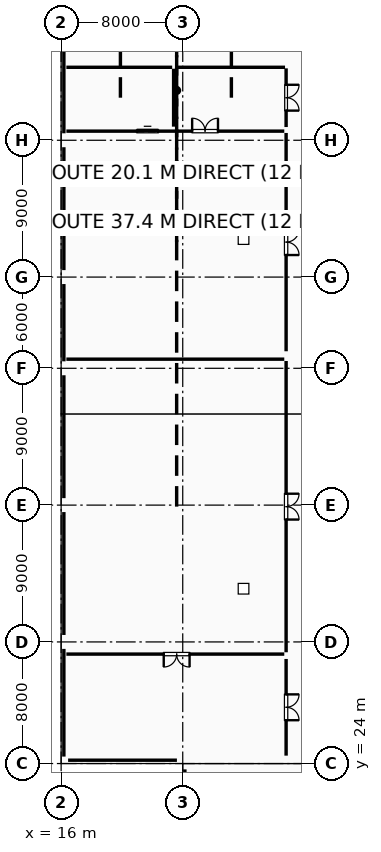
"""IFC4 building model, lengths in metres.
Left out: names, types, materials, properties, quantities, classifications, styles, units other than length and angle.
Written with IfcOpenShell. Run it as: python <this file> out.ifc"""

import sys

from ifc_helpers import new_model, si_unit, direction, frame, frame_2d, origin, origin_2d, place, context, subcontext, project, spatial, rectangle, extrude, element, fill, save


model = new_model("IFC4")
c1 = context("Model", 3, precision=1e-05, world=origin(), true_north=direction((0.0, 1.0)))
c2 = subcontext(c1, "Body", "Model", "MODEL_VIEW")
j1 = project(units=[si_unit("LENGTHUNIT", "METRE"), si_unit("PLANEANGLEUNIT", "RADIAN")], contexts=[c1])
p1 = place(None, origin())
s1 = spatial("IfcSite", under=j1, at=p1, CompositionType="ELEMENT")
p2 = place(p1, origin())
s2 = spatial("IfcBuilding", under=s1, at=p2, CompositionType="ELEMENT")
p3 = place(p2, frame((0.0, 0.0, 19.8)))
s3 = spatial("IfcBuildingStorey", under=s2, at=p3, CompositionType="ELEMENT", Elevation=19.8)
for number, where, z_axis, x_axis in (
    (1, (16.0, 24.0, 0.0), (0.0, 0.0, 1.0), (1.0, 0.0, 0.0)),
    (2, (16.0, 32.0, 0.0), (0.0, 0.0, 1.0), (1.0, 0.0, 0.0)),
    (3, (16.0, 41.0, 0.0), (0.0, 0.0, 1.0), (1.0, 0.0, 0.0)),
    (4, (16.0, 50.0, 0.0), (0.0, 0.0, 1.0), (1.0, 0.0, 0.0)),
    (5, (16.0, 56.0, 0.0), (0.0, 0.0, 1.0), (1.0, 0.0, 0.0)),
    (6, (16.0, 65.0, 0.0), (0.0, 0.0, 1.0), (1.0, 0.0, 0.0)),
):
    element("IfcColumn", number, at=place(p3, frame(where, z_axis=z_axis, x_axis=x_axis)), inside=s3, PredefinedType="COLUMN", context=c2, shape_type="SweptSolid", body=[
        extrude(rectangle(XDim=0.9, YDim=0.9, at=origin_2d()), origin(), (0.0, 0.0, 1.0), 4.5),
    ])
for number, where, z_axis, x_axis in (
    (7, (24.0, 24.0, 0.0), (0.0, 0.0, 1.0), (1.0, 0.0, 0.0)),
    (8, (24.0, 50.0, 0.0), (0.0, 0.0, 1.0), (1.0, 0.0, 0.0)),
    (9, (24.0, 56.0, 0.0), (0.0, 0.0, 1.0), (1.0, 0.0, 0.0)),
    (10, (24.0, 65.0, 0.0), (0.0, 0.0, 1.0), (1.0, 0.0, 0.0)),
    (11, (32.0, 24.0, 0.0), (0.0, 0.0, 1.0), (1.0, 0.0, 0.0)),
    (12, (32.0, 50.0, 0.0), (0.0, 0.0, 1.0), (1.0, 0.0, 0.0)),
    (13, (32.0, 56.0, 0.0), (0.0, 0.0, 1.0), (1.0, 0.0, 0.0)),
    (14, (32.0, 65.0, 0.0), (0.0, 0.0, 1.0), (1.0, 0.0, 0.0)),
):
    element("IfcColumn", number, at=place(p3, frame(where, z_axis=z_axis, x_axis=x_axis)), inside=s3, PredefinedType="COLUMN", context=c2, shape_type="SweptSolid", body=[
        extrude(rectangle(XDim=0.75, YDim=0.75, at=origin_2d()), origin(), (0.0, 0.0, 1.0), 4.5),
    ])
p4 = place(p3, frame((24.14, 8.13, 0.0), z_axis=(0.0, 0.0, 1.0), x_axis=(0.0, 1.0, 0.0)))
e15 = element("IfcWall", 15, at=p4, inside=s3, PredefinedType="ELEMENTEDWALL", context=c2, shape_type="SweptSolid", body=[
    extrude(rectangle(XDim=15.487, YDim=0.24, at=frame_2d((7.744, 0.0))), origin(), (0.0, 0.0, 1.0), 4.28),
])
p5 = place(p3, frame((23.617, 24.22, 0.0), z_axis=(0.0, 0.0, 1.0), x_axis=(-1.0, 0.0, 0.0)))
e16 = element("IfcWall", 16, at=p5, inside=s3, PredefinedType="STANDARD", context=c2, shape_type="SweptSolid", body=[
    extrude(rectangle(XDim=7.159, YDim=0.4, at=frame_2d((3.58, 0.0))), origin(), (0.0, 0.0, 1.0), 3.735),
])
p6 = place(p5, frame((2.38, 0.0, 0.95)))
e17 = element("IfcOpeningElement", 17, at=p6, cuts=e16, PredefinedType="OPENING", context=c2, shape_type="SweptSolid", body=[
    extrude(rectangle(XDim=2.4, YDim=1.8, at=frame_2d((1.2, 0.9))), frame((0.0, 0.21, 0.0), z_axis=(0.0, -1.0, 0.0), x_axis=(1.0, 0.0, 0.0)), (0.0, 0.0, 1.0), 0.42),
])
p7 = place(p3, frame((16.18, 24.458, 0.0), z_axis=(0.0, 0.0, 1.0), x_axis=(0.0, 1.0, 0.0)))
e18 = element("IfcWall", 18, at=p7, inside=s3, PredefinedType="STANDARD", context=c2, shape_type="SweptSolid", body=[
    extrude(rectangle(XDim=7.084, YDim=0.32, at=frame_2d((3.542, 0.0))), origin(), (0.0, 0.0, 1.0), 3.635),
])
p8 = place(p7, frame((2.342, 0.0, 0.95)))
e19 = element("IfcOpeningElement", 19, at=p8, cuts=e18, PredefinedType="OPENING", context=c2, shape_type="SweptSolid", body=[
    extrude(rectangle(XDim=2.4, YDim=2.1, at=frame_2d((1.2, 1.05))), frame((0.0, 0.17, 0.0), z_axis=(0.0, -1.0, 0.0), x_axis=(1.0, 0.0, 0.0)), (0.0, 0.0, 1.0), 0.34),
])
p9 = place(p3, frame((16.18, 32.458, 0.0), z_axis=(0.0, 0.0, 1.0), x_axis=(0.0, 1.0, 0.0)))
e20 = element("IfcWall", 20, at=p9, inside=s3, PredefinedType="STANDARD", context=c2, shape_type="SweptSolid", body=[
    extrude(rectangle(XDim=8.084, YDim=0.32, at=frame_2d((4.042, 0.0))), origin(), (0.0, 0.0, 1.0), 3.685),
])
p10 = place(p9, frame((3.592, 0.0, 0.95)))
e21 = element("IfcOpeningElement", 21, at=p10, cuts=e20, PredefinedType="OPENING", context=c2, shape_type="SweptSolid", body=[
    extrude(rectangle(XDim=0.9, YDim=1.2, at=frame_2d((0.45, 0.6))), frame((0.0, 0.17, 0.0), z_axis=(0.0, -1.0, 0.0), x_axis=(1.0, 0.0, 0.0)), (0.0, 0.0, 1.0), 0.34),
])
p11 = place(p3, frame((16.18, 41.458, 0.0), z_axis=(0.0, 0.0, 1.0), x_axis=(0.0, 1.0, 0.0)))
e22 = element("IfcWall", 22, at=p11, inside=s3, PredefinedType="STANDARD", context=c2, shape_type="SweptSolid", body=[
    extrude(rectangle(XDim=8.084, YDim=0.32, at=frame_2d((4.042, 0.0))), origin(), (0.0, 0.0, 1.0), 3.735),
])
p12 = place(p11, frame((3.592, 0.0, 0.95)))
e23 = element("IfcOpeningElement", 23, at=p12, cuts=e22, PredefinedType="OPENING", context=c2, shape_type="SweptSolid", body=[
    extrude(rectangle(XDim=0.9, YDim=1.5, at=frame_2d((0.45, 0.75))), frame((0.0, 0.17, 0.0), z_axis=(0.0, -1.0, 0.0), x_axis=(1.0, 0.0, 0.0)), (0.0, 0.0, 1.0), 0.34),
])
p13 = place(p3, frame((16.18, 50.458, 0.0), z_axis=(0.0, 0.0, 1.0), x_axis=(0.0, 1.0, 0.0)))
e24 = element("IfcWall", 24, at=p13, inside=s3, PredefinedType="STANDARD", context=c2, shape_type="SweptSolid", body=[
    extrude(rectangle(XDim=5.084, YDim=0.32, at=frame_2d((2.542, 0.0))), origin(), (0.0, 0.0, 1.0), 3.785),
])
p14 = place(p13, frame((2.092, 0.0, 0.95)))
e25 = element("IfcOpeningElement", 25, at=p14, cuts=e24, PredefinedType="OPENING", context=c2, shape_type="SweptSolid", body=[
    extrude(rectangle(XDim=0.9, YDim=1.8, at=frame_2d((0.45, 0.9))), frame((0.0, 0.17, 0.0), z_axis=(0.0, -1.0, 0.0), x_axis=(1.0, 0.0, 0.0)), (0.0, 0.0, 1.0), 0.34),
])
p15 = place(p3, frame((16.18, 56.458, 0.0), z_axis=(0.0, 0.0, 1.0), x_axis=(0.0, 1.0, 0.0)))
e26 = element("IfcWall", 26, at=p15, inside=s3, PredefinedType="STANDARD", context=c2, shape_type="SweptSolid", body=[
    extrude(rectangle(XDim=8.084, YDim=0.32, at=frame_2d((4.042, 0.0))), origin(), (0.0, 0.0, 1.0), 3.835),
])
p16 = place(p15, frame((3.592, 0.0, 0.95)))
e27 = element("IfcOpeningElement", 27, at=p16, cuts=e26, PredefinedType="OPENING", context=c2, shape_type="SweptSolid", body=[
    extrude(rectangle(XDim=0.9, YDim=2.1, at=frame_2d((0.45, 1.05))), frame((0.0, 0.17, 0.0), z_axis=(0.0, -1.0, 0.0), x_axis=(1.0, 0.0, 0.0)), (0.0, 0.0, 1.0), 0.34),
])
p17 = place(p3, frame((16.18, 65.458, 0.0), z_axis=(0.0, 0.0, 1.0), x_axis=(0.0, 1.0, 0.0)))
e28 = element("IfcWall", 28, at=p17, inside=s3, PredefinedType="STANDARD", context=c2, shape_type="SweptSolid", body=[
    extrude(rectangle(XDim=8.084, YDim=0.32, at=frame_2d((4.042, 0.0))), origin(), (0.0, 0.0, 1.0), 3.885),
])
p18 = place(p3, frame((16.344, 50.6, 0.0), z_axis=(0.0, 0.0, 1.0), x_axis=(1.0, 0.0, 0.0)))
e29 = element("IfcWall", 29, at=p18, inside=s3, PredefinedType="PARTITIONING", context=c2, shape_type="SweptSolid", body=[
    extrude(rectangle(XDim=14.336, YDim=0.2, at=frame_2d((7.168, 0.0))), origin(), (0.0, 0.0, 1.0), 4.5),
])
p19 = place(p3, frame((30.8, 50.48, 0.0), z_axis=(0.0, 0.0, 1.0), x_axis=(0.0, -1.0, 0.0)))
e30 = element("IfcWall", 30, at=p19, inside=s3, PredefinedType="PARTITIONING", context=c2, shape_type="SweptSolid", body=[
    extrude(rectangle(XDim=19.16, YDim=0.2, at=frame_2d((9.58, 0.0))), origin(), (0.0, 0.0, 1.0), 4.5),
])
p20 = place(p19, frame((8.73, 0.0, 0.0)))
e31 = element("IfcOpeningElement", 31, at=p20, cuts=e30, PredefinedType="OPENING", context=c2, shape_type="SweptSolid", body=[
    extrude(rectangle(XDim=1.7, YDim=2.25, at=frame_2d((0.85, 1.125))), frame((0.0, 0.11, 0.0), z_axis=(0.0, -1.0, 0.0), x_axis=(1.0, 0.0, 0.0)), (0.0, 0.0, 1.0), 0.22),
])
p21 = place(p3, frame((30.68, 31.2, 0.0), z_axis=(0.0, 0.0, 1.0), x_axis=(-1.0, 0.0, 0.0)))
e32 = element("IfcWall", 32, at=p21, inside=s3, PredefinedType="PARTITIONING", context=c2, shape_type="SweptSolid", body=[
    extrude(rectangle(XDim=14.336, YDim=0.2, at=frame_2d((7.168, 0.0))), origin(), (0.0, 0.0, 1.0), 4.5),
])
p22 = place(p21, frame((6.23, 0.0, 0.0)))
e33 = element("IfcOpeningElement", 33, at=p22, cuts=e32, PredefinedType="OPENING", context=c2, shape_type="SweptSolid", body=[
    extrude(rectangle(XDim=1.7, YDim=2.25, at=frame_2d((0.85, 1.125))), frame((0.0, 0.11, 0.0), z_axis=(0.0, -1.0, 0.0), x_axis=(1.0, 0.0, 0.0)), (0.0, 0.0, 1.0), 0.22),
])
p23 = place(p3, frame((16.344, 65.6, 0.0), z_axis=(0.0, 0.0, 1.0), x_axis=(1.0, 0.0, 0.0)))
e34 = element("IfcWall", 34, at=p23, inside=s3, PredefinedType="PARTITIONING", context=c2, shape_type="SweptSolid", body=[
    extrude(rectangle(XDim=14.336, YDim=0.2, at=frame_2d((7.168, 0.0))), origin(), (0.0, 0.0, 1.0), 4.24),
])
p24 = place(p23, frame((4.642, 0.0, 0.0)))
e35 = element("IfcOpeningElement", 35, at=p24, cuts=e34, PredefinedType="OPENING", context=c2, shape_type="SweptSolid", body=[
    extrude(rectangle(XDim=1.4, YDim=2.15, at=frame_2d((0.7, 1.075))), frame((0.0, 0.11, 0.0), z_axis=(0.0, -1.0, 0.0), x_axis=(1.0, 0.0, 0.0)), (0.0, 0.0, 1.0), 0.22),
])
p25 = place(p23, frame((8.275, 0.0, 0.0)))
e36 = element("IfcOpeningElement", 36, at=p25, cuts=e34, PredefinedType="OPENING", context=c2, shape_type="SweptSolid", body=[
    extrude(rectangle(XDim=1.7, YDim=2.25, at=frame_2d((0.85, 1.125))), frame((0.0, 0.11, 0.0), z_axis=(0.0, -1.0, 0.0), x_axis=(1.0, 0.0, 0.0)), (0.0, 0.0, 1.0), 0.22),
])
p26 = place(p3, frame((30.8, 65.48, 0.0), z_axis=(0.0, 0.0, 1.0), x_axis=(0.0, -1.0, 0.0)))
e37 = element("IfcWall", 37, at=p26, inside=s3, PredefinedType="PARTITIONING", context=c2, shape_type="SweptSolid", body=[
    extrude(rectangle(XDim=14.36, YDim=0.2, at=frame_2d((7.18, 0.0))), origin(), (0.0, 0.0, 1.0), 4.24),
])
p27 = place(p26, frame((6.33, 0.0, 0.0)))
e38 = element("IfcOpeningElement", 38, at=p27, cuts=e37, PredefinedType="OPENING", context=c2, shape_type="SweptSolid", body=[
    extrude(rectangle(XDim=1.7, YDim=2.25, at=frame_2d((0.85, 1.125))), frame((0.0, 0.11, 0.0), z_axis=(0.0, -1.0, 0.0), x_axis=(1.0, 0.0, 0.0)), (0.0, 0.0, 1.0), 0.22),
])
p28 = place(p3, frame((16.344, 69.8, 0.0), z_axis=(0.0, 0.0, 1.0), x_axis=(1.0, 0.0, 0.0)))
e39 = element("IfcWall", 39, at=p28, inside=s3, PredefinedType="PARTITIONING", context=c2, shape_type="SweptSolid", body=[
    extrude(rectangle(XDim=6.961, YDim=0.15, at=frame_2d((3.48, 0.0))), origin(), (0.0, 0.0, 1.0), 4.5),
])
p29 = place(p3, frame((23.4, 69.705, 0.0), z_axis=(0.0, 0.0, 1.0), x_axis=(0.0, -1.0, 0.0)))
e40 = element("IfcWall", 40, at=p29, inside=s3, PredefinedType="PARTITIONING", context=c2, shape_type="SweptSolid", body=[
    extrude(rectangle(XDim=3.81, YDim=0.15, at=frame_2d((1.905, 0.0))), origin(), (0.0, 0.0, 1.0), 4.5),
])
p30 = place(p3, frame((23.67, 69.8, 0.0), z_axis=(0.0, 0.0, 1.0), x_axis=(1.0, 0.0, 0.0)))
e41 = element("IfcWall", 41, at=p30, inside=s3, PredefinedType="PARTITIONING", context=c2, shape_type="SweptSolid", body=[
    extrude(rectangle(XDim=7.06, YDim=0.1, at=frame_2d((3.53, 0.0))), origin(), (0.0, 0.0, 1.0), 4.24),
])
p31 = place(p3, frame((30.8, 69.73, 0.0), z_axis=(0.0, 0.0, 1.0), x_axis=(0.0, -1.0, 0.0)))
e42 = element("IfcWall", 42, at=p31, inside=s3, PredefinedType="PARTITIONING", context=c2, shape_type="SweptSolid", body=[
    extrude(rectangle(XDim=3.86, YDim=0.1, at=frame_2d((1.93, 0.0))), origin(), (0.0, 0.0, 1.0), 4.24),
])
p32 = place(p31, frame((1.08, 0.0, 0.0)))
e43 = element("IfcOpeningElement", 43, at=p32, cuts=e42, PredefinedType="OPENING", context=c2, shape_type="SweptSolid", body=[
    extrude(rectangle(XDim=1.7, YDim=2.25, at=frame_2d((0.85, 1.125))), frame((0.0, 0.06, 0.0), z_axis=(0.0, -1.0, 0.0), x_axis=(1.0, 0.0, 0.0)), (0.0, 0.0, 1.0), 0.12),
])
p33 = place(p3, frame((30.8, 30.88, 0.0), z_axis=(0.0, 0.0, 1.0), x_axis=(0.0, -1.0, 0.0)))
e44 = element("IfcWall", 44, at=p33, inside=s3, PredefinedType="PARTITIONING", context=c2, shape_type="SweptSolid", body=[
    extrude(rectangle(XDim=6.36, YDim=0.2, at=frame_2d((3.18, 0.0))), origin(), (0.0, 0.0, 1.0), 4.5),
])
p34 = place(p33, frame((2.33, 0.0, 0.0)))
e45 = element("IfcOpeningElement", 45, at=p34, cuts=e44, PredefinedType="OPENING", context=c2, shape_type="SweptSolid", body=[
    extrude(rectangle(XDim=1.7, YDim=2.25, at=frame_2d((0.85, 1.125))), frame((0.0, 0.11, 0.0), z_axis=(0.0, -1.0, 0.0), x_axis=(1.0, 0.0, 0.0)), (0.0, 0.0, 1.0), 0.22),
])
p35 = place(p6, origin())
e46 = element("IfcWindow", 46, at=p35, inside=s3, PartitioningType="SINGLE_PANEL", PredefinedType="SKYLIGHT", context=c2, shape_type="SweptSolid", body=[
    extrude(rectangle(XDim=2.4, YDim=1.8, at=frame_2d((1.2, 0.9))), frame((0.0, 0.03, 0.0), z_axis=(0.0, -1.0, 0.0), x_axis=(1.0, 0.0, 0.0)), (0.0, 0.0, 1.0), 0.06),
])
fill(e17, e46)
p36 = place(p8, origin())
e47 = element("IfcWindow", 47, at=p36, inside=s3, PartitioningType="SINGLE_PANEL", PredefinedType="SKYLIGHT", context=c2, shape_type="SweptSolid", body=[
    extrude(rectangle(XDim=2.4, YDim=2.1, at=frame_2d((1.2, 1.05))), frame((0.0, 0.03, 0.0), z_axis=(0.0, -1.0, 0.0), x_axis=(1.0, 0.0, 0.0)), (0.0, 0.0, 1.0), 0.06),
])
fill(e19, e47)
p37 = place(p10, origin())
e48 = element("IfcWindow", 48, at=p37, inside=s3, PartitioningType="SINGLE_PANEL", PredefinedType="WINDOW", context=c2, shape_type="SweptSolid", body=[
    extrude(rectangle(XDim=0.9, YDim=1.2, at=frame_2d((0.45, 0.6))), frame((0.0, 0.03, 0.0), z_axis=(0.0, -1.0, 0.0), x_axis=(1.0, 0.0, 0.0)), (0.0, 0.0, 1.0), 0.06),
])
fill(e21, e48)
p38 = place(p12, origin())
e49 = element("IfcWindow", 49, at=p38, inside=s3, PartitioningType="SINGLE_PANEL", PredefinedType="WINDOW", context=c2, shape_type="SweptSolid", body=[
    extrude(rectangle(XDim=0.9, YDim=1.5, at=frame_2d((0.45, 0.75))), frame((0.0, 0.03, 0.0), z_axis=(0.0, -1.0, 0.0), x_axis=(1.0, 0.0, 0.0)), (0.0, 0.0, 1.0), 0.06),
])
fill(e23, e49)
p39 = place(p14, origin())
e50 = element("IfcWindow", 50, at=p39, inside=s3, PartitioningType="SINGLE_PANEL", PredefinedType="WINDOW", context=c2, shape_type="SweptSolid", body=[
    extrude(rectangle(XDim=0.9, YDim=1.8, at=frame_2d((0.45, 0.9))), frame((0.0, 0.03, 0.0), z_axis=(0.0, -1.0, 0.0), x_axis=(1.0, 0.0, 0.0)), (0.0, 0.0, 1.0), 0.06),
])
fill(e25, e50)
p40 = place(p16, origin())
e51 = element("IfcWindow", 51, at=p40, inside=s3, PartitioningType="SINGLE_PANEL", PredefinedType="WINDOW", context=c2, shape_type="SweptSolid", body=[
    extrude(rectangle(XDim=0.9, YDim=2.1, at=frame_2d((0.45, 1.05))), frame((0.0, 0.03, 0.0), z_axis=(0.0, -1.0, 0.0), x_axis=(1.0, 0.0, 0.0)), (0.0, 0.0, 1.0), 0.06),
])
fill(e27, e51)
p41 = place(p20, origin())
e52 = element("IfcDoor", 52, at=p41, inside=s3, OperationType="DOUBLE_DOOR_SINGLE_SWING", PredefinedType="DOOR", context=c2, shape_type="SweptSolid", body=[
    extrude(rectangle(XDim=1.7, YDim=2.25, at=frame_2d((0.85, 1.125))), frame((0.0, 0.025, 0.0), z_axis=(0.0, -1.0, 0.0), x_axis=(1.0, 0.0, 0.0)), (0.0, 0.0, 1.0), 0.05),
])
fill(e31, e52)
p42 = place(p22, origin())
e53 = element("IfcDoor", 53, at=p42, inside=s3, OperationType="DOUBLE_DOOR_SINGLE_SWING", PredefinedType="DOOR", context=c2, shape_type="SweptSolid", body=[
    extrude(rectangle(XDim=1.7, YDim=2.25, at=frame_2d((0.85, 1.125))), frame((0.0, 0.025, 0.0), z_axis=(0.0, -1.0, 0.0), x_axis=(1.0, 0.0, 0.0)), (0.0, 0.0, 1.0), 0.05),
])
fill(e33, e53)
p43 = place(p27, origin())
e54 = element("IfcDoor", 54, at=p43, inside=s3, OperationType="DOUBLE_DOOR_SINGLE_SWING", PredefinedType="DOOR", context=c2, shape_type="SweptSolid", body=[
    extrude(rectangle(XDim=1.7, YDim=2.25, at=frame_2d((0.85, 1.125))), frame((0.0, 0.025, 0.0), z_axis=(0.0, -1.0, 0.0), x_axis=(1.0, 0.0, 0.0)), (0.0, 0.0, 1.0), 0.05),
])
fill(e38, e54)
p44 = place(p24, origin())
e55 = element("IfcDoor", 55, at=p44, inside=s3, OperationType="SLIDING_TO_LEFT", PredefinedType="DOOR", context=c2, shape_type="SweptSolid", body=[
    extrude(rectangle(XDim=1.4, YDim=2.15, at=frame_2d((0.7, 1.075))), frame((0.0, 0.025, 0.0), z_axis=(0.0, -1.0, 0.0), x_axis=(1.0, 0.0, 0.0)), (0.0, 0.0, 1.0), 0.05),
])
fill(e35, e55)
p45 = place(p25, origin())
e56 = element("IfcDoor", 56, at=p45, inside=s3, OperationType="DOUBLE_DOOR_SINGLE_SWING", PredefinedType="DOOR", context=c2, shape_type="SweptSolid", body=[
    extrude(rectangle(XDim=1.7, YDim=2.25, at=frame_2d((0.85, 1.125))), frame((0.0, 0.025, 0.0), z_axis=(0.0, -1.0, 0.0), x_axis=(1.0, 0.0, 0.0)), (0.0, 0.0, 1.0), 0.05),
])
fill(e36, e56)
p46 = place(p32, origin())
e57 = element("IfcDoor", 57, at=p46, inside=s3, OperationType="DOUBLE_DOOR_SINGLE_SWING", PredefinedType="DOOR", context=c2, shape_type="SweptSolid", body=[
    extrude(rectangle(XDim=1.7, YDim=2.25, at=frame_2d((0.85, 1.125))), frame((0.0, 0.025, 0.0), z_axis=(0.0, -1.0, 0.0), x_axis=(1.0, 0.0, 0.0)), (0.0, 0.0, 1.0), 0.05),
])
fill(e43, e57)
p47 = place(p34, origin())
e58 = element("IfcDoor", 58, at=p47, inside=s3, OperationType="DOUBLE_DOOR_SINGLE_SWING", PredefinedType="DOOR", context=c2, shape_type="SweptSolid", body=[
    extrude(rectangle(XDim=1.7, YDim=2.25, at=frame_2d((0.85, 1.125))), frame((0.0, 0.025, 0.0), z_axis=(0.0, -1.0, 0.0), x_axis=(1.0, 0.0, 0.0)), (0.0, 0.0, 1.0), 0.05),
])
fill(e45, e58)
save(model, sys.argv[1])
